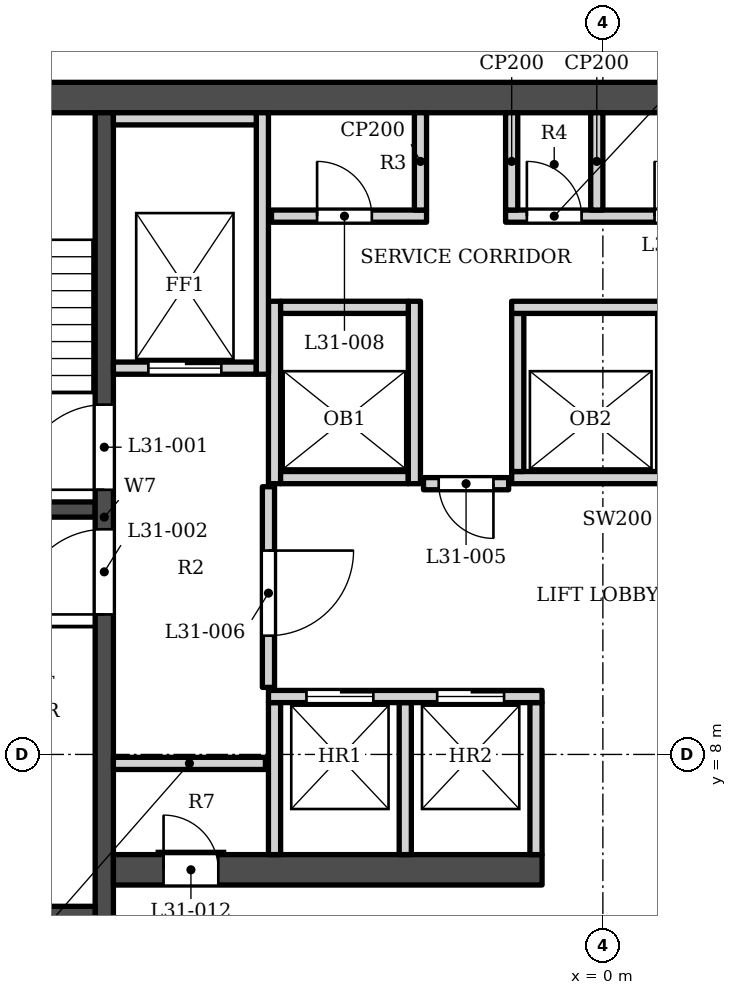
"""IFC4 building model, lengths in metres.
Left out: names, types, materials, properties, quantities, classifications, styles, units other than length and angle.
Written with IfcOpenShell. Run it as: python <this file> out.ifc"""

import sys

from ifc_helpers import new_model, si_unit, direction, frame, frame_2d, origin, place, context, subcontext, project, spatial, rectangle, extrude, element, fill, save


model = new_model("IFC4")
c1 = context("Model", 3, precision=1e-05, world=origin(), true_north=direction((0.0, 1.0)))
c2 = subcontext(c1, "Body", "Model", "MODEL_VIEW")
j1 = project(units=[si_unit("LENGTHUNIT", "METRE"), si_unit("PLANEANGLEUNIT", "RADIAN")], contexts=[c1])
p1 = place(None, origin())
s1 = spatial("IfcSite", under=j1, at=p1, CompositionType="ELEMENT")
p2 = place(p1, origin())
s2 = spatial("IfcBuilding", under=s1, at=p2, CompositionType="ELEMENT")
p3 = place(p2, frame((0.0, 0.0, 132.6)))
s3 = spatial("IfcBuildingStorey", under=s2, at=p3, CompositionType="ELEMENT", Elevation=132.6)
p4 = place(p3, frame((-16.9, 18.802, 0.0), z_axis=(0.0, 0.0, 1.0), x_axis=(1.0, 0.0, 0.0)))
e1 = element("IfcWall", 1, at=p4, inside=s3, PredefinedType="SHEAR", context=c2, shape_type="SweptSolid", body=[
    extrude(rectangle(XDim=33.8, YDim=0.5, at=frame_2d((16.9, 0.0))), origin(), (0.0, 0.0, 1.0), 7.0),
])
p5 = place(p3, frame((-8.2, 5.253, 0.0), z_axis=(0.0, 0.0, 1.0), x_axis=(0.0, 1.0, 0.0)))
e2 = element("IfcWall", 2, at=p5, inside=s3, PredefinedType="SHEAR", context=c2, shape_type="SweptSolid", body=[
    extrude(rectangle(XDim=13.3, YDim=0.3, at=frame_2d((6.65, 0.0))), origin(), (0.0, 0.0, 1.0), 7.0),
])
p6 = place(p5, frame((7.1, 0.0, 0.0)))
e3 = element("IfcOpeningElement", 3, at=p6, cuts=e2, PredefinedType="OPENING", context=c2, shape_type="SweptSolid", body=[
    extrude(rectangle(XDim=1.4, YDim=2.1, at=frame_2d((0.7, 1.05))), frame((0.0, 0.16, 0.0), z_axis=(0.0, -1.0, 0.0), x_axis=(1.0, 0.0, 0.0)), (0.0, 0.0, 1.0), 0.32),
])
p7 = place(p5, frame((5.05, 0.0, 0.0)))
e4 = element("IfcOpeningElement", 4, at=p7, cuts=e2, PredefinedType="OPENING", context=c2, shape_type="SweptSolid", body=[
    extrude(rectangle(XDim=1.4, YDim=2.1, at=frame_2d((0.7, 1.05))), frame((0.0, 0.16, 0.0), z_axis=(0.0, -1.0, 0.0), x_axis=(1.0, 0.0, 0.0)), (0.0, 0.0, 1.0), 0.32),
])
for number, where, z_axis, x_axis in (
    (5, (-12.1, 12.028, 0.0), (0.0, 0.0, 1.0), (1.0, 0.0, 0.0)),
    (6, (-12.1, 5.378, 0.0), (0.0, 0.0, 1.0), (1.0, 0.0, 0.0)),
):
    element("IfcWall", number, at=place(p3, frame(where, z_axis=z_axis, x_axis=x_axis)), inside=s3, PredefinedType="SHEAR", context=c2, shape_type="SweptSolid", body=[
        extrude(rectangle(XDim=3.75, YDim=0.25, at=frame_2d((1.875, 0.0))), origin(), (0.0, 0.0, 1.0), 7.0),
    ])
p8 = place(p3, frame((-8.05, 6.103, 0.0), z_axis=(0.0, 0.0, 1.0), x_axis=(1.0, 0.0, 0.0)))
e7 = element("IfcWall", 7, at=p8, inside=s3, PredefinedType="SHEAR", context=c2, shape_type="SweptSolid", body=[
    extrude(rectangle(XDim=7.05, YDim=0.5, at=frame_2d((3.525, 0.0))), origin(), (0.0, 0.0, 1.0), 7.0),
])
p9 = place(p8, frame((0.825, 0.0, 0.0)))
e8 = element("IfcOpeningElement", 8, at=p9, cuts=e7, PredefinedType="OPENING", context=c2, shape_type="SweptSolid", body=[
    extrude(rectangle(XDim=0.9, YDim=2.1, at=frame_2d((0.45, 1.05))), frame((0.0, 0.26, 0.0), z_axis=(0.0, -1.0, 0.0), x_axis=(1.0, 0.0, 0.0)), (0.0, 0.0, 1.0), 0.52),
])
for number, where, z_axis, x_axis in (
    (9, (-5.4, 6.353, 0.0), (0.0, 0.0, 1.0), (0.0, 1.0, 0.0)),
    (10, (-3.25, 6.353, 0.0), (0.0, 0.0, 1.0), (0.0, 1.0, 0.0)),
    (11, (-1.1, 6.353, 0.0), (0.0, 0.0, 1.0), (0.0, 1.0, 0.0)),
    (12, (-8.05, 7.853, 0.0), (0.0, 0.0, 1.0), (1.0, 0.0, 0.0)),
):
    element("IfcWall", number, at=place(p3, frame(where, z_axis=z_axis, x_axis=x_axis)), inside=s3, PredefinedType="SOLIDWALL", context=c2, shape_type="SweptSolid", body=[
        extrude(rectangle(XDim=2.5, YDim=0.2, at=frame_2d((1.25, 0.0))), origin(), (0.0, 0.0, 1.0), 6.7),
    ])
p10 = place(p3, frame((-5.5, 8.953, 0.0), z_axis=(0.0, 0.0, 1.0), x_axis=(1.0, 0.0, 0.0)))
e13 = element("IfcWall", 13, at=p10, inside=s3, PredefinedType="SOLIDWALL", context=c2, shape_type="SweptSolid", body=[
    extrude(rectangle(XDim=4.5, YDim=0.2, at=frame_2d((2.25, 0.0))), origin(), (0.0, 0.0, 1.0), 6.7),
])
p11 = place(p10, frame((0.625, 0.0, 0.0)))
e14 = element("IfcOpeningElement", 14, at=p11, cuts=e13, PredefinedType="OPENING", context=c2, shape_type="SweptSolid", body=[
    extrude(rectangle(XDim=1.1, YDim=2.1, at=frame_2d((0.55, 1.05))), frame((0.0, 0.11, 0.0), z_axis=(0.0, -1.0, 0.0), x_axis=(1.0, 0.0, 0.0)), (0.0, 0.0, 1.0), 0.22),
])
p12 = place(p10, frame((2.775, 0.0, 0.0)))
e15 = element("IfcOpeningElement", 15, at=p12, cuts=e13, PredefinedType="OPENING", context=c2, shape_type="SweptSolid", body=[
    extrude(rectangle(XDim=1.1, YDim=2.1, at=frame_2d((0.55, 1.05))), frame((0.0, 0.11, 0.0), z_axis=(0.0, -1.0, 0.0), x_axis=(1.0, 0.0, 0.0)), (0.0, 0.0, 1.0), 0.22),
])
p13 = place(p3, frame((-5.5, 9.103, 0.0), z_axis=(0.0, 0.0, 1.0), x_axis=(0.0, 1.0, 0.0)))
e16 = element("IfcWall", 16, at=p13, inside=s3, PredefinedType="SOLIDWALL", context=c2, shape_type="SweptSolid", body=[
    extrude(rectangle(XDim=3.3, YDim=0.2, at=frame_2d((1.65, 0.0))), origin(), (0.0, 0.0, 1.0), 6.7),
])
p14 = place(p13, frame((0.85, 0.0, 0.0)))
e17 = element("IfcOpeningElement", 17, at=p14, cuts=e16, PredefinedType="OPENING", context=c2, shape_type="SweptSolid", body=[
    extrude(rectangle(XDim=1.4, YDim=2.1, at=frame_2d((0.7, 1.05))), frame((0.0, 0.11, 0.0), z_axis=(0.0, -1.0, 0.0), x_axis=(1.0, 0.0, 0.0)), (0.0, 0.0, 1.0), 0.22),
])
p15 = place(p3, frame((-2.95, 12.453, 0.0), z_axis=(0.0, 0.0, 1.0), x_axis=(1.0, 0.0, 0.0)))
e18 = element("IfcWall", 18, at=p15, inside=s3, PredefinedType="SOLIDWALL", context=c2, shape_type="SweptSolid", body=[
    extrude(rectangle(XDim=1.4, YDim=0.2, at=frame_2d((0.7, 0.0))), origin(), (0.0, 0.0, 1.0), 6.7),
])
p16 = place(p15, frame((0.25, 0.0, 0.0)))
e19 = element("IfcOpeningElement", 19, at=p16, cuts=e18, PredefinedType="OPENING", context=c2, shape_type="SweptSolid", body=[
    extrude(rectangle(XDim=0.9, YDim=2.1, at=frame_2d((0.45, 1.05))), frame((0.0, 0.11, 0.0), z_axis=(0.0, -1.0, 0.0), x_axis=(1.0, 0.0, 0.0)), (0.0, 0.0, 1.0), 0.22),
])
p17 = place(p3, frame((-5.4, 12.453, 0.0), z_axis=(0.0, 0.0, 1.0), x_axis=(0.0, 1.0, 0.0)))
e20 = element("IfcWall", 20, at=p17, inside=s3, PredefinedType="SOLIDWALL", context=c2, shape_type="SweptSolid", body=[
    extrude(rectangle(XDim=3.0, YDim=0.2, at=frame_2d((1.5, 0.0))), origin(), (0.0, 0.0, 1.0), 6.7),
])
p18 = place(p3, frame((-5.3, 12.552, 0.0), z_axis=(0.0, 0.0, 1.0), x_axis=(1.0, 0.0, 0.0)))
e21 = element("IfcWall", 21, at=p18, inside=s3, PredefinedType="SOLIDWALL", context=c2, shape_type="SweptSolid", body=[
    extrude(rectangle(XDim=2.1, YDim=0.2, at=frame_2d((1.05, 0.0))), origin(), (0.0, 0.0, 1.0), 6.7),
])
p19 = place(p3, frame((-3.1, 12.453, 0.0), z_axis=(0.0, 0.0, 1.0), x_axis=(0.0, 1.0, 0.0)))
e22 = element("IfcWall", 22, at=p19, inside=s3, PredefinedType="SOLIDWALL", context=c2, shape_type="SweptSolid", body=[
    extrude(rectangle(XDim=3.0, YDim=0.2, at=frame_2d((1.5, 0.0))), origin(), (0.0, 0.0, 1.0), 6.7),
])
p20 = place(p3, frame((-1.5, 12.552, 0.0), z_axis=(0.0, 0.0, 1.0), x_axis=(1.0, 0.0, 0.0)))
e23 = element("IfcWall", 23, at=p20, inside=s3, PredefinedType="SOLIDWALL", context=c2, shape_type="SweptSolid", body=[
    extrude(rectangle(XDim=7.0, YDim=0.2, at=frame_2d((3.5, 0.0))), origin(), (0.0, 0.0, 1.0), 6.7),
])
p21 = place(p20, frame((3.075, 0.0, 0.0)))
e24 = element("IfcOpeningElement", 24, at=p21, cuts=e23, PredefinedType="OPENING", context=c2, shape_type="SweptSolid", body=[
    extrude(rectangle(XDim=1.1, YDim=2.1, at=frame_2d((0.55, 1.05))), frame((0.0, 0.11, 0.0), z_axis=(0.0, -1.0, 0.0), x_axis=(1.0, 0.0, 0.0)), (0.0, 0.0, 1.0), 0.22),
])
p22 = place(p20, frame((5.275, 0.0, 0.0)))
e25 = element("IfcOpeningElement", 25, at=p22, cuts=e23, PredefinedType="OPENING", context=c2, shape_type="SweptSolid", body=[
    extrude(rectangle(XDim=1.1, YDim=2.1, at=frame_2d((0.55, 1.05))), frame((0.0, 0.11, 0.0), z_axis=(0.0, -1.0, 0.0), x_axis=(1.0, 0.0, 0.0)), (0.0, 0.0, 1.0), 0.22),
])
p23 = place(p3, frame((-1.4, 12.653, 0.0), z_axis=(0.0, 0.0, 1.0), x_axis=(0.0, 1.0, 0.0)))
e26 = element("IfcWall", 26, at=p23, inside=s3, PredefinedType="SOLIDWALL", context=c2, shape_type="SweptSolid", body=[
    extrude(rectangle(XDim=2.6, YDim=0.2, at=frame_2d((1.3, 0.0))), origin(), (0.0, 0.0, 1.0), 6.7),
])
p24 = place(p3, frame((-8.05, 14.353, 0.0), z_axis=(0.0, 0.0, 1.0), x_axis=(1.0, 0.0, 0.0)))
e27 = element("IfcWall", 27, at=p24, inside=s3, PredefinedType="SOLIDWALL", context=c2, shape_type="SweptSolid", body=[
    extrude(rectangle(XDim=2.35, YDim=0.2, at=frame_2d((1.175, 0.0))), origin(), (0.0, 0.0, 1.0), 6.7),
])
p25 = place(p24, frame((0.575, 0.0, 0.0)))
e28 = element("IfcOpeningElement", 28, at=p25, cuts=e27, PredefinedType="OPENING", context=c2, shape_type="SweptSolid", body=[
    extrude(rectangle(XDim=1.2, YDim=2.1, at=frame_2d((0.6, 1.05))), frame((0.0, 0.11, 0.0), z_axis=(0.0, -1.0, 0.0), x_axis=(1.0, 0.0, 0.0)), (0.0, 0.0, 1.0), 0.22),
])
p26 = place(p3, frame((-5.6, 14.253, 0.0), z_axis=(0.0, 0.0, 1.0), x_axis=(0.0, 1.0, 0.0)))
e29 = element("IfcWall", 29, at=p26, inside=s3, PredefinedType="SOLIDWALL", context=c2, shape_type="SweptSolid", body=[
    extrude(rectangle(XDim=4.3, YDim=0.2, at=frame_2d((2.15, 0.0))), origin(), (0.0, 0.0, 1.0), 6.7),
])
p27 = place(p3, frame((-5.3, 15.353, 0.0), z_axis=(0.0, 0.0, 1.0), x_axis=(1.0, 0.0, 0.0)))
e30 = element("IfcWall", 30, at=p27, inside=s3, PredefinedType="SOLIDWALL", context=c2, shape_type="SweptSolid", body=[
    extrude(rectangle(XDim=2.1, YDim=0.2, at=frame_2d((1.05, 0.0))), origin(), (0.0, 0.0, 1.0), 6.7),
])
p28 = place(p3, frame((-1.5, 15.353, 0.0), z_axis=(0.0, 0.0, 1.0), x_axis=(1.0, 0.0, 0.0)))
e31 = element("IfcWall", 31, at=p28, inside=s3, PredefinedType="SOLIDWALL", context=c2, shape_type="SweptSolid", body=[
    extrude(rectangle(XDim=7.2, YDim=0.2, at=frame_2d((3.6, 0.0))), origin(), (0.0, 0.0, 1.0), 6.7),
])
p29 = place(p3, frame((-5.45, 16.853, 0.0), z_axis=(0.0, 0.0, 1.0), x_axis=(1.0, 0.0, 0.0)))
e32 = element("IfcWall", 32, at=p29, inside=s3, PredefinedType="SOLIDWALL", context=c2, shape_type="SweptSolid", body=[
    extrude(rectangle(XDim=2.55, YDim=0.2, at=frame_2d((1.275, 0.0))), origin(), (0.0, 0.0, 1.0), 6.7),
])
p30 = place(p29, frame((0.75, 0.0, 0.0)))
e33 = element("IfcOpeningElement", 33, at=p30, cuts=e32, PredefinedType="OPENING", context=c2, shape_type="SweptSolid", body=[
    extrude(rectangle(XDim=0.9, YDim=2.1, at=frame_2d((0.45, 1.05))), frame((0.0, 0.11, 0.0), z_axis=(0.0, -1.0, 0.0), x_axis=(1.0, 0.0, 0.0)), (0.0, 0.0, 1.0), 0.22),
])
p31 = place(p3, frame((-1.6, 16.853, 0.0), z_axis=(0.0, 0.0, 1.0), x_axis=(1.0, 0.0, 0.0)))
e34 = element("IfcWall", 34, at=p31, inside=s3, PredefinedType="SOLIDWALL", context=c2, shape_type="SweptSolid", body=[
    extrude(rectangle(XDim=7.05, YDim=0.2, at=frame_2d((3.525, 0.0))), origin(), (0.0, 0.0, 1.0), 6.7),
])
p32 = place(p31, frame((0.35, 0.0, 0.0)))
e35 = element("IfcOpeningElement", 35, at=p32, cuts=e34, PredefinedType="OPENING", context=c2, shape_type="SweptSolid", body=[
    extrude(rectangle(XDim=0.9, YDim=2.1, at=frame_2d((0.45, 1.05))), frame((0.0, 0.11, 0.0), z_axis=(0.0, -1.0, 0.0), x_axis=(1.0, 0.0, 0.0)), (0.0, 0.0, 1.0), 0.22),
])
p33 = place(p31, frame((2.45, 0.0, 0.0)))
e36 = element("IfcOpeningElement", 36, at=p33, cuts=e34, PredefinedType="OPENING", context=c2, shape_type="SweptSolid", body=[
    extrude(rectangle(XDim=0.9, YDim=2.1, at=frame_2d((0.45, 1.05))), frame((0.0, 0.11, 0.0), z_axis=(0.0, -1.0, 0.0), x_axis=(1.0, 0.0, 0.0)), (0.0, 0.0, 1.0), 0.22),
])
p34 = place(p31, frame((5.25, 0.0, 0.0)))
e37 = element("IfcOpeningElement", 37, at=p34, cuts=e34, PredefinedType="OPENING", context=c2, shape_type="SweptSolid", body=[
    extrude(rectangle(XDim=0.9, YDim=2.1, at=frame_2d((0.45, 1.05))), frame((0.0, 0.11, 0.0), z_axis=(0.0, -1.0, 0.0), x_axis=(1.0, 0.0, 0.0)), (0.0, 0.0, 1.0), 0.22),
])
for number, where, z_axis, x_axis in (
    (38, (-3.0, 16.953, 0.0), (0.0, 0.0, 1.0), (0.0, 1.0, 0.0)),
    (39, (-1.5, 16.953, 0.0), (0.0, 0.0, 1.0), (0.0, 1.0, 0.0)),
    (40, (-0.1, 16.953, 0.0), (0.0, 0.0, 1.0), (0.0, 1.0, 0.0)),
):
    element("IfcWall", number, at=place(p3, frame(where, z_axis=z_axis, x_axis=x_axis)), inside=s3, PredefinedType="PARTITIONING", context=c2, shape_type="SweptSolid", body=[
        extrude(rectangle(XDim=1.6, YDim=0.2, at=frame_2d((0.8, 0.0))), origin(), (0.0, 0.0, 1.0), 6.7),
    ])
p35 = place(p3, frame((-8.05, 18.453, 0.0), z_axis=(0.0, 0.0, 1.0), x_axis=(1.0, 0.0, 0.0)))
e41 = element("IfcWall", 41, at=p35, inside=s3, PredefinedType="SOLIDWALL", context=c2, shape_type="SweptSolid", body=[
    extrude(rectangle(XDim=2.35, YDim=0.2, at=frame_2d((1.175, 0.0))), origin(), (0.0, 0.0, 1.0), 6.7),
])
p36 = place(p11, origin())
e42 = element("IfcDoor", 42, at=p36, inside=s3, OperationType="DOUBLE_DOOR_SLIDING", PredefinedType="DOOR", context=c2, shape_type="SweptSolid", body=[
    extrude(rectangle(XDim=1.1, YDim=2.1, at=frame_2d((0.55, 1.05))), frame((0.0, 0.025, 0.0), z_axis=(0.0, -1.0, 0.0), x_axis=(1.0, 0.0, 0.0)), (0.0, 0.0, 1.0), 0.05),
])
fill(e14, e42)
p37 = place(p12, origin())
e43 = element("IfcDoor", 43, at=p37, inside=s3, OperationType="DOUBLE_DOOR_SLIDING", PredefinedType="DOOR", context=c2, shape_type="SweptSolid", body=[
    extrude(rectangle(XDim=1.1, YDim=2.1, at=frame_2d((0.55, 1.05))), frame((0.0, 0.025, 0.0), z_axis=(0.0, -1.0, 0.0), x_axis=(1.0, 0.0, 0.0)), (0.0, 0.0, 1.0), 0.05),
])
fill(e15, e43)
p38 = place(p25, origin())
e44 = element("IfcDoor", 44, at=p38, inside=s3, OperationType="DOUBLE_DOOR_SLIDING", PredefinedType="DOOR", context=c2, shape_type="SweptSolid", body=[
    extrude(rectangle(XDim=1.2, YDim=2.1, at=frame_2d((0.6, 1.05))), frame((0.0, 0.025, 0.0), z_axis=(0.0, -1.0, 0.0), x_axis=(1.0, 0.0, 0.0)), (0.0, 0.0, 1.0), 0.05),
])
fill(e28, e44)
p39 = place(p6, origin())
e45 = element("IfcDoor", 45, at=p39, inside=s3, OperationType="SINGLE_SWING_LEFT", PredefinedType="DOOR", context=c2, shape_type="SweptSolid", body=[
    extrude(rectangle(XDim=1.4, YDim=2.1, at=frame_2d((0.7, 1.05))), frame((0.0, 0.025, 0.0), z_axis=(0.0, -1.0, 0.0), x_axis=(1.0, 0.0, 0.0)), (0.0, 0.0, 1.0), 0.05),
])
fill(e3, e45)
p40 = place(p7, origin())
e46 = element("IfcDoor", 46, at=p40, inside=s3, OperationType="SINGLE_SWING_LEFT", PredefinedType="DOOR", context=c2, shape_type="SweptSolid", body=[
    extrude(rectangle(XDim=1.4, YDim=2.1, at=frame_2d((0.7, 1.05))), frame((0.0, 0.025, 0.0), z_axis=(0.0, -1.0, 0.0), x_axis=(1.0, 0.0, 0.0)), (0.0, 0.0, 1.0), 0.05),
])
fill(e4, e46)
p41 = place(p16, origin())
e47 = element("IfcDoor", 47, at=p41, inside=s3, OperationType="SINGLE_SWING_RIGHT", PredefinedType="DOOR", context=c2, shape_type="SweptSolid", body=[
    extrude(rectangle(XDim=0.9, YDim=2.1, at=frame_2d((0.45, 1.05))), frame((0.0, 0.025, 0.0), z_axis=(0.0, -1.0, 0.0), x_axis=(1.0, 0.0, 0.0)), (0.0, 0.0, 1.0), 0.05),
])
fill(e19, e47)
p42 = place(p14, origin())
e48 = element("IfcDoor", 48, at=p42, inside=s3, OperationType="SINGLE_SWING_RIGHT", PredefinedType="DOOR", context=c2, shape_type="SweptSolid", body=[
    extrude(rectangle(XDim=1.4, YDim=2.1, at=frame_2d((0.7, 1.05))), frame((0.0, 0.025, 0.0), z_axis=(0.0, -1.0, 0.0), x_axis=(1.0, 0.0, 0.0)), (0.0, 0.0, 1.0), 0.05),
])
fill(e17, e48)
p43 = place(p30, origin())
e49 = element("IfcDoor", 49, at=p43, inside=s3, OperationType="SINGLE_SWING_LEFT", PredefinedType="DOOR", context=c2, shape_type="SweptSolid", body=[
    extrude(rectangle(XDim=0.9, YDim=2.1, at=frame_2d((0.45, 1.05))), frame((0.0, 0.025, 0.0), z_axis=(0.0, -1.0, 0.0), x_axis=(1.0, 0.0, 0.0)), (0.0, 0.0, 1.0), 0.05),
])
fill(e33, e49)
p44 = place(p32, origin())
e50 = element("IfcDoor", 50, at=p44, inside=s3, OperationType="SINGLE_SWING_LEFT", PredefinedType="DOOR", context=c2, shape_type="SweptSolid", body=[
    extrude(rectangle(XDim=0.9, YDim=2.1, at=frame_2d((0.45, 1.05))), frame((0.0, 0.025, 0.0), z_axis=(0.0, -1.0, 0.0), x_axis=(1.0, 0.0, 0.0)), (0.0, 0.0, 1.0), 0.05),
])
fill(e35, e50)
p45 = place(p33, origin())
e51 = element("IfcDoor", 51, at=p45, inside=s3, OperationType="SINGLE_SWING_LEFT", PredefinedType="DOOR", context=c2, shape_type="SweptSolid", body=[
    extrude(rectangle(XDim=0.9, YDim=2.1, at=frame_2d((0.45, 1.05))), frame((0.0, 0.025, 0.0), z_axis=(0.0, -1.0, 0.0), x_axis=(1.0, 0.0, 0.0)), (0.0, 0.0, 1.0), 0.05),
])
fill(e36, e51)
p46 = place(p9, origin())
e52 = element("IfcDoor", 52, at=p46, inside=s3, OperationType="SINGLE_SWING_LEFT", PredefinedType="DOOR", context=c2, shape_type="SweptSolid", body=[
    extrude(rectangle(XDim=0.9, YDim=2.1, at=frame_2d((0.45, 1.05))), frame((0.0, 0.025, 0.0), z_axis=(0.0, -1.0, 0.0), x_axis=(1.0, 0.0, 0.0)), (0.0, 0.0, 1.0), 0.05),
])
fill(e8, e52)
save(model, sys.argv[1])
